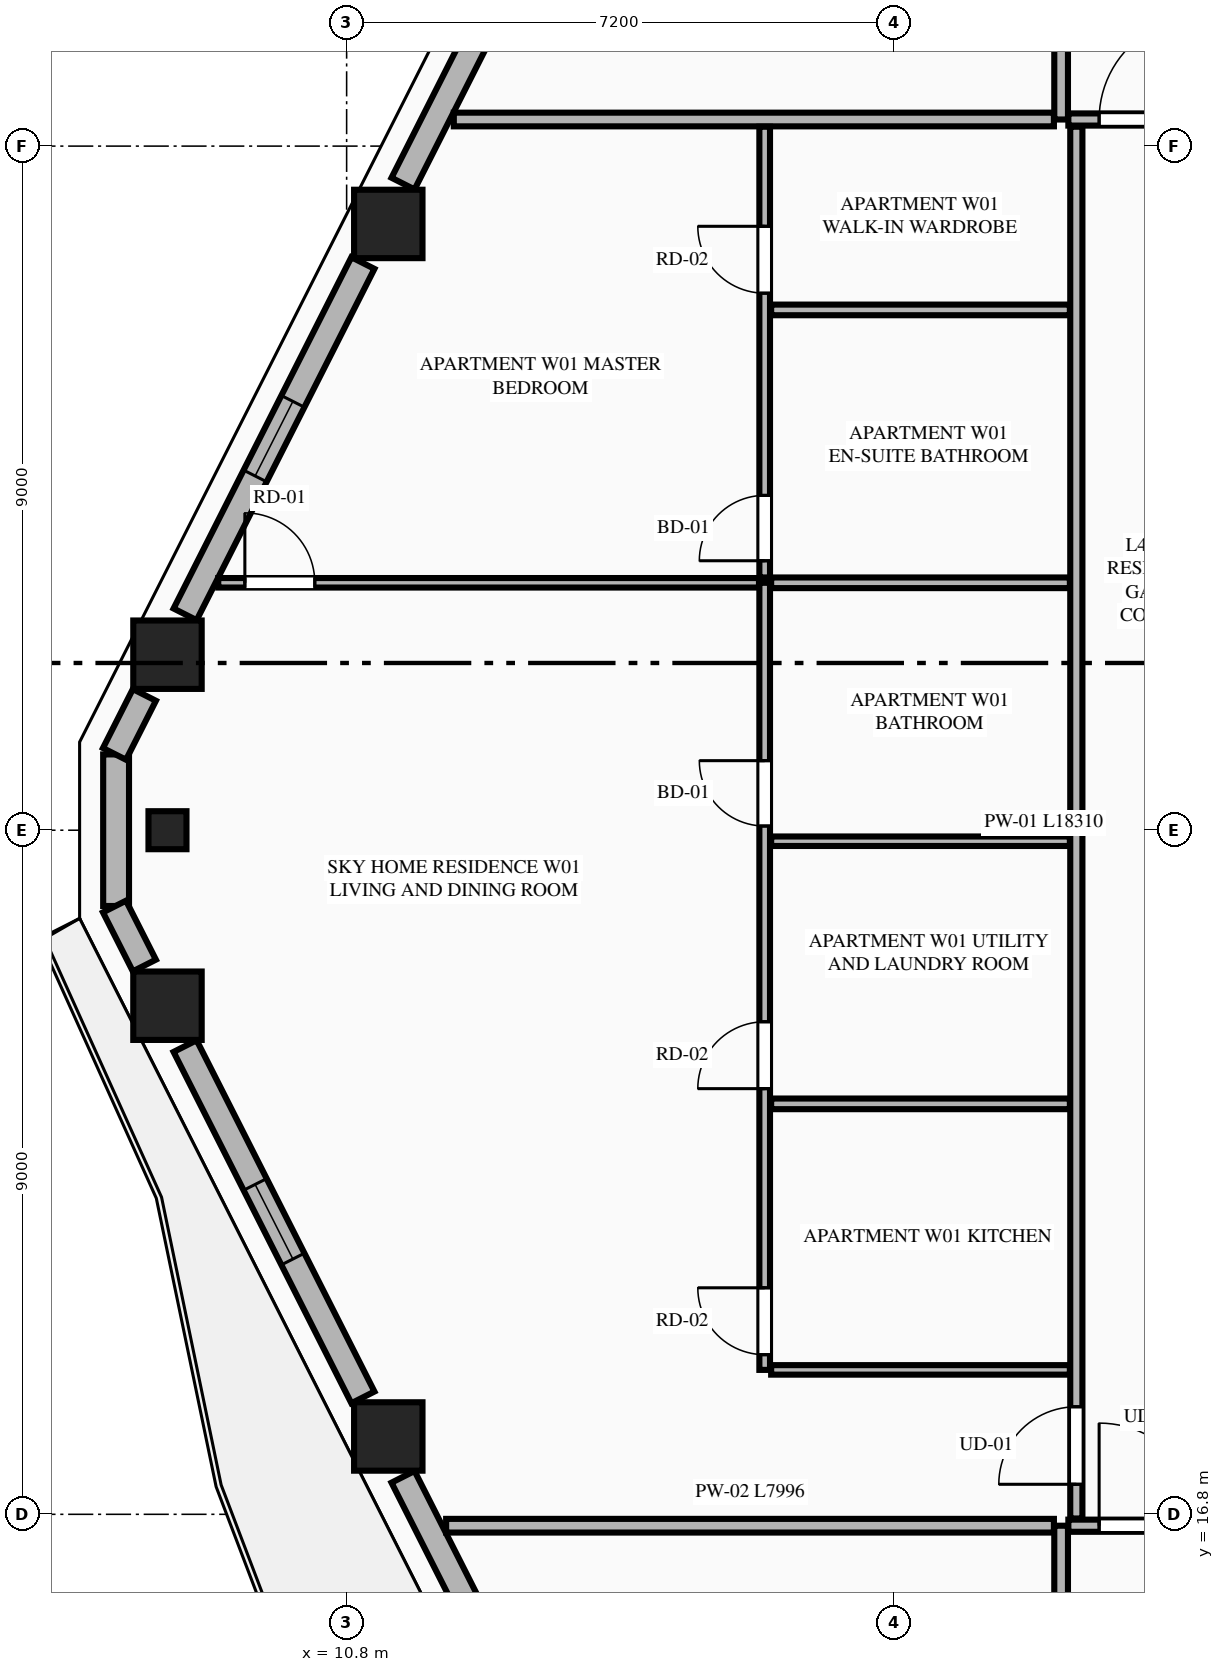
"""IFC4 building model, lengths in metres.
Left out: names, types, materials, properties, quantities, classifications, styles, units other than length and angle.
Written with IfcOpenShell. Run it as: python <this file> out.ifc"""

import sys

from ifc_helpers import new_model, si_unit, direction, frame, frame_2d, origin, origin_2d, place, context, subcontext, project, spatial, rectangle, extrude, element, fill, save


model = new_model("IFC4")
c1 = context("Model", 3, precision=1e-05, world=origin(), true_north=direction((0.0, 1.0)))
c2 = subcontext(c1, "Body", "Model", "MODEL_VIEW")
j1 = project(units=[si_unit("LENGTHUNIT", "METRE"), si_unit("PLANEANGLEUNIT", "RADIAN")], contexts=[c1])
p1 = place(None, origin())
s1 = spatial("IfcSite", under=j1, at=p1, CompositionType="ELEMENT")
p2 = place(p1, origin())
s2 = spatial("IfcBuilding", under=s1, at=p2, CompositionType="ELEMENT")
p3 = place(p2, frame((0.0, 0.0, 157.05)))
s3 = spatial("IfcBuildingStorey", under=s2, at=p3, CompositionType="ELEMENT", Elevation=157.05)
for number, where, z_axis, x_axis in (
    (1, (11.348, 33.776, 0.0), (0.0, 0.0, 1.0), (1.0, 0.0, 0.0)),
    (2, (8.443, 28.109, 0.0), (0.0, 0.0, 1.0), (1.0, 0.0, 0.0)),
    (3, (8.443, 23.491, 0.0), (0.0, 0.0, 1.0), (1.0, 0.0, 0.0)),
    (4, (11.348, 17.824, 0.0), (0.0, 0.0, 1.0), (1.0, 0.0, 0.0)),
):
    element("IfcColumn", number, at=place(p3, frame(where, z_axis=z_axis, x_axis=x_axis)), inside=s3, PredefinedType="COLUMN", context=c2, shape_type="SweptSolid", body=[
        extrude(rectangle(XDim=0.9, YDim=0.9, at=origin_2d()), origin(), (0.0, 0.0, 1.0), 3.55),
    ])
p4 = place(p3, frame((8.443, 25.8, 0.0), z_axis=(0.0, 0.0, 1.0), x_axis=(0.0, -1.0, 0.0)))
e5 = element("IfcColumn", 5, at=p4, inside=s3, PredefinedType="PILASTER", context=c2, shape_type="SweptSolid", body=[
    extrude(rectangle(XDim=0.5, YDim=0.35, at=origin_2d()), origin(), (0.0, 0.0, 1.0), 3.55),
])
p5 = place(p3, frame((7.767, 26.797, 0.0), z_axis=(0.0, 0.0, 1.0), x_axis=(0.0, -1.0, 0.0)))
e6 = element("IfcWall", 6, at=p5, inside=s3, PredefinedType="STANDARD", context=c2, shape_type="SweptSolid", body=[
    extrude(rectangle(XDim=1.994, YDim=0.34, at=frame_2d((0.997, 0.0))), origin(), (0.0, 0.0, 1.0), 3.34),
])
p6 = place(p3, frame((13.982, 39.129, 0.0), z_axis=(0.0, 0.0, 1.0), x_axis=(-0.451491174807, -0.892275584711, 0.0)))
e7 = element("IfcWall", 7, at=p6, inside=s3, PredefinedType="STANDARD", context=c2, shape_type="SweptSolid", body=[
    extrude(rectangle(XDim=5.404, YDim=0.34, at=frame_2d((2.702, 0.0))), origin(), (0.0, 0.0, 1.0), 2.797),
])
p7 = place(p6, frame((2.152, 0.0, 0.75)))
e8 = element("IfcOpeningElement", 8, at=p7, cuts=e7, PredefinedType="OPENING", context=c2, shape_type="SweptSolid", body=[
    extrude(rectangle(XDim=1.1, YDim=1.897, at=frame_2d((0.55, 0.948))), frame((0.0, 0.18, 0.0), z_axis=(0.0, -1.0, 0.0), x_axis=(1.0, 0.0, 0.0)), (0.0, 0.0, 1.0), 0.36),
])
p8 = place(p3, frame((11.014, 33.262, 0.0), z_axis=(0.0, 0.0, 1.0), x_axis=(-0.451506699894, -0.892267728852, 0.0)))
e9 = element("IfcWall", 9, at=p8, inside=s3, PredefinedType="STANDARD", context=c2, shape_type="SweptSolid", body=[
    extrude(rectangle(XDim=5.18, YDim=0.34, at=frame_2d((2.59, 0.0))), origin(), (0.0, 0.0, 1.0), 2.797),
])
p9 = place(p8, frame((2.04, 0.0, 0.75)))
e10 = element("IfcOpeningElement", 10, at=p9, cuts=e9, PredefinedType="OPENING", context=c2, shape_type="SweptSolid", body=[
    extrude(rectangle(XDim=1.1, YDim=1.897, at=frame_2d((0.55, 0.948))), frame((0.0, 0.18, 0.0), z_axis=(0.0, -1.0, 0.0), x_axis=(1.0, 0.0, 0.0)), (0.0, 0.0, 1.0), 0.36),
])
p10 = place(p3, frame((8.139, 27.58, 0.0), z_axis=(0.0, 0.0, 1.0), x_axis=(-0.451586578297, -0.892227304168, 0.0)))
e11 = element("IfcWall", 11, at=p10, inside=s3, PredefinedType="STANDARD", context=c2, shape_type="SweptSolid", body=[
    extrude(rectangle(XDim=0.87, YDim=0.34, at=frame_2d((0.435, 0.0))), origin(), (0.0, 0.0, 1.0), 3.34),
])
p11 = place(p3, frame((7.746, 24.796, 0.0), z_axis=(0.0, 0.0, 1.0), x_axis=(0.451699687084, -0.892170046957, 0.0)))
e12 = element("IfcWall", 12, at=p11, inside=s3, PredefinedType="STANDARD", context=c2, shape_type="SweptSolid", body=[
    extrude(rectangle(XDim=0.87, YDim=0.34, at=frame_2d((0.435, 0.0))), origin(), (0.0, 0.0, 1.0), 3.34),
])
p12 = place(p3, frame((8.675, 22.96, 0.0), z_axis=(0.0, 0.0, 1.0), x_axis=(0.451506699894, -0.892267728852, 0.0)))
e13 = element("IfcWall", 13, at=p12, inside=s3, PredefinedType="STANDARD", context=c2, shape_type="SweptSolid", body=[
    extrude(rectangle(XDim=5.18, YDim=0.34, at=frame_2d((2.59, 0.0))), origin(), (0.0, 0.0, 1.0), 2.797),
])
p13 = place(p12, frame((2.04, 0.0, 0.75)))
e14 = element("IfcOpeningElement", 14, at=p13, cuts=e13, PredefinedType="OPENING", context=c2, shape_type="SweptSolid", body=[
    extrude(rectangle(XDim=1.1, YDim=1.897, at=frame_2d((0.55, 0.948))), frame((0.0, 0.18, 0.0), z_axis=(0.0, -1.0, 0.0), x_axis=(1.0, 0.0, 0.0)), (0.0, 0.0, 1.0), 0.36),
])
p14 = place(p3, frame((11.542, 17.293, 0.0), z_axis=(0.0, 0.0, 1.0), x_axis=(0.451491174807, -0.892275584711, 0.0)))
e15 = element("IfcWall", 15, at=p14, inside=s3, PredefinedType="STANDARD", context=c2, shape_type="SweptSolid", body=[
    extrude(rectangle(XDim=5.404, YDim=0.34, at=frame_2d((2.702, 0.0))), origin(), (0.0, 0.0, 1.0), 2.797),
])
p15 = place(p14, frame((2.637, 0.0, 0.0)))
e16 = element("IfcOpeningElement", 16, at=p15, cuts=e15, PredefinedType="OPENING", context=c2, shape_type="SweptSolid", body=[
    extrude(rectangle(XDim=1.1, YDim=2.25, at=frame_2d((0.55, 1.125))), frame((0.0, 0.18, 0.0), z_axis=(0.0, -1.0, 0.0), x_axis=(1.0, 0.0, 0.0)), (0.0, 0.0, 1.0), 0.36),
])
p16 = place(p3, frame((20.2, 4.105, 0.0), z_axis=(0.0, 0.0, 1.0), x_axis=(0.0, 1.0, 0.0)))
e17 = element("IfcWall", 17, at=p16, inside=s3, PredefinedType="PARTITIONING", context=c2, shape_type="SweptSolid", body=[
    extrude(rectangle(XDim=12.545, YDim=0.18, at=frame_2d((6.272, 0.0))), origin(), (0.0, 0.0, 1.0), 3.34),
])
p17 = place(p3, frame((20.295, 16.65, 0.0), z_axis=(0.0, 0.0, 1.0), x_axis=(1.0, 0.0, 0.0)))
e18 = element("IfcWall", 18, at=p17, inside=s3, PredefinedType="PARTITIONING", context=c2, shape_type="SweptSolid", body=[
    extrude(rectangle(XDim=15.842, YDim=0.16, at=frame_2d((7.921, 0.0))), origin(), (0.0, 0.0, 1.0), 3.34),
])
p18 = place(p17, frame((0.405, 0.0, 0.0)))
e19 = element("IfcOpeningElement", 19, at=p18, cuts=e18, PredefinedType="OPENING", context=c2, shape_type="SweptSolid", body=[
    extrude(rectangle(XDim=1.35, YDim=2.35, at=frame_2d((0.675, 1.175))), frame((0.0, 0.09, 0.0), z_axis=(0.0, -1.0, 0.0), x_axis=(1.0, 0.0, 0.0)), (0.0, 0.0, 1.0), 0.18),
])
p19 = place(p3, frame((20.2, 35.15, 0.0), z_axis=(0.0, 0.0, 1.0), x_axis=(0.0, 1.0, 0.0)))
e20 = element("IfcWall", 20, at=p19, inside=s3, PredefinedType="PARTITIONING", context=c2, shape_type="SweptSolid", body=[
    extrude(rectangle(XDim=12.345, YDim=0.18, at=frame_2d((6.173, 0.0))), origin(), (0.0, 0.0, 1.0), 3.34),
])
p20 = place(p3, frame((20.295, 35.15, 0.0), z_axis=(0.0, 0.0, 1.0), x_axis=(1.0, 0.0, 0.0)))
e21 = element("IfcWall", 21, at=p20, inside=s3, PredefinedType="PARTITIONING", context=c2, shape_type="SweptSolid", body=[
    extrude(rectangle(XDim=24.21, YDim=0.16, at=frame_2d((12.105, 0.0))), origin(), (0.0, 0.0, 1.0), 3.34),
])
p21 = place(p20, frame((0.405, 0.0, 0.0)))
e22 = element("IfcOpeningElement", 22, at=p21, cuts=e21, PredefinedType="OPENING", context=c2, shape_type="SweptSolid", body=[
    extrude(rectangle(XDim=1.35, YDim=2.35, at=frame_2d((0.675, 1.175))), frame((0.0, 0.09, 0.0), z_axis=(0.0, -1.0, 0.0), x_axis=(1.0, 0.0, 0.0)), (0.0, 0.0, 1.0), 0.18),
])
p22 = place(p3, frame((12.109, 16.65, 0.0), z_axis=(0.0, 0.0, 1.0), x_axis=(1.0, 0.0, 0.0)))
e23 = element("IfcWall", 23, at=p22, inside=s3, PredefinedType="PARTITIONING", context=c2, shape_type="SweptSolid", body=[
    extrude(rectangle(XDim=7.996, YDim=0.18, at=frame_2d((3.998, 0.0))), origin(), (0.0, 0.0, 1.0), 3.34),
])
p23 = place(p3, frame((12.21, 35.15, 0.0), z_axis=(0.0, 0.0, 1.0), x_axis=(1.0, 0.0, 0.0)))
e24 = element("IfcWall", 24, at=p23, inside=s3, PredefinedType="PARTITIONING", context=c2, shape_type="SweptSolid", body=[
    extrude(rectangle(XDim=7.895, YDim=0.18, at=frame_2d((3.948, 0.0))), origin(), (0.0, 0.0, 1.0), 3.34),
])
p24 = place(p3, frame((20.4, 16.745, 0.0), z_axis=(0.0, 0.0, 1.0), x_axis=(0.0, 1.0, 0.0)))
e25 = element("IfcWall", 25, at=p24, inside=s3, PredefinedType="PARTITIONING", context=c2, shape_type="SweptSolid", body=[
    extrude(rectangle(XDim=18.31, YDim=0.16, at=frame_2d((9.155, 0.0))), origin(), (0.0, 0.0, 1.0), 3.34),
])
p25 = place(p24, frame((0.45, 0.0, 0.0)))
e26 = element("IfcOpeningElement", 26, at=p25, cuts=e25, PredefinedType="OPENING", context=c2, shape_type="SweptSolid", body=[
    extrude(rectangle(XDim=1.02, YDim=2.25, at=frame_2d((0.51, 1.125))), frame((0.0, 0.09, 0.0), z_axis=(0.0, -1.0, 0.0), x_axis=(1.0, 0.0, 0.0)), (0.0, 0.0, 1.0), 0.18),
])
p26 = place(p3, frame((16.385, 18.7, 0.0), z_axis=(0.0, 0.0, 1.0), x_axis=(1.0, 0.0, 0.0)))
e27 = element("IfcWall", 27, at=p26, inside=s3, PredefinedType="PARTITIONING", context=c2, shape_type="SweptSolid", body=[
    extrude(rectangle(XDim=3.93, YDim=0.125, at=frame_2d((1.965, 0.0))), origin(), (0.0, 0.0, 1.0), 2.722),
])
p27 = place(p3, frame((16.3, 18.7, 0.0), z_axis=(0.0, 0.0, 1.0), x_axis=(0.0, 1.0, 0.0)))
e28 = element("IfcWall", 28, at=p27, inside=s3, PredefinedType="PLUMBINGWALL", context=c2, shape_type="SweptSolid", body=[
    extrude(rectangle(XDim=10.355, YDim=0.14, at=frame_2d((5.177, 0.0))), origin(), (0.0, 0.0, 1.0), 3.34),
])
p28 = place(p27, frame((0.2, 0.0, 0.0)))
e29 = element("IfcOpeningElement", 29, at=p28, cuts=e28, PredefinedType="OPENING", context=c2, shape_type="SweptSolid", body=[
    extrude(rectangle(XDim=0.88, YDim=2.15, at=frame_2d((0.44, 1.075))), frame((0.0, 0.08, 0.0), z_axis=(0.0, -1.0, 0.0), x_axis=(1.0, 0.0, 0.0)), (0.0, 0.0, 1.0), 0.16),
])
p29 = place(p27, frame((3.7, 0.0, 0.0)))
e30 = element("IfcOpeningElement", 30, at=p29, cuts=e28, PredefinedType="OPENING", context=c2, shape_type="SweptSolid", body=[
    extrude(rectangle(XDim=0.88, YDim=2.15, at=frame_2d((0.44, 1.075))), frame((0.0, 0.08, 0.0), z_axis=(0.0, -1.0, 0.0), x_axis=(1.0, 0.0, 0.0)), (0.0, 0.0, 1.0), 0.16),
])
p30 = place(p27, frame((7.155, 0.0, 0.0)))
e31 = element("IfcOpeningElement", 31, at=p30, cuts=e28, PredefinedType="OPENING", context=c2, shape_type="SweptSolid", body=[
    extrude(rectangle(XDim=0.86, YDim=2.1, at=frame_2d((0.43, 1.05))), frame((0.0, 0.08, 0.0), z_axis=(0.0, -1.0, 0.0), x_axis=(1.0, 0.0, 0.0)), (0.0, 0.0, 1.0), 0.16),
])
p31 = place(p3, frame((16.3, 29.125, 0.0), z_axis=(0.0, 0.0, 1.0), x_axis=(0.0, 1.0, 0.0)))
e32 = element("IfcWall", 32, at=p31, inside=s3, PredefinedType="PLUMBINGWALL", context=c2, shape_type="SweptSolid", body=[
    extrude(rectangle(XDim=5.93, YDim=0.14, at=frame_2d((2.965, 0.0))), origin(), (0.0, 0.0, 1.0), 3.34),
])
p32 = place(p31, frame((0.22, 0.0, 0.0)))
e33 = element("IfcOpeningElement", 33, at=p32, cuts=e32, PredefinedType="OPENING", context=c2, shape_type="SweptSolid", body=[
    extrude(rectangle(XDim=0.86, YDim=2.1, at=frame_2d((0.43, 1.05))), frame((0.0, 0.08, 0.0), z_axis=(0.0, -1.0, 0.0), x_axis=(1.0, 0.0, 0.0)), (0.0, 0.0, 1.0), 0.16),
])
p33 = place(p31, frame((3.74, 0.0, 0.0)))
e34 = element("IfcOpeningElement", 34, at=p33, cuts=e32, PredefinedType="OPENING", context=c2, shape_type="SweptSolid", body=[
    extrude(rectangle(XDim=0.88, YDim=2.15, at=frame_2d((0.44, 1.075))), frame((0.0, 0.08, 0.0), z_axis=(0.0, -1.0, 0.0), x_axis=(1.0, 0.0, 0.0)), (0.0, 0.0, 1.0), 0.16),
])
p34 = place(p3, frame((16.385, 29.055, 0.0), z_axis=(0.0, 0.0, 1.0), x_axis=(1.0, 0.0, 0.0)))
e35 = element("IfcWall", 35, at=p34, inside=s3, PredefinedType="PLUMBINGWALL", context=c2, shape_type="SweptSolid", body=[
    extrude(rectangle(XDim=3.93, YDim=0.14, at=frame_2d((1.965, 0.0))), origin(), (0.0, 0.0, 1.0), 3.34),
])
p35 = place(p3, frame((9.111, 29.055, 0.0), z_axis=(0.0, 0.0, 1.0), x_axis=(1.0, 0.0, 0.0)))
e36 = element("IfcWall", 36, at=p35, inside=s3, PredefinedType="PARTITIONING", context=c2, shape_type="SweptSolid", body=[
    extrude(rectangle(XDim=7.114, YDim=0.125, at=frame_2d((3.557, 0.0))), origin(), (0.0, 0.0, 1.0), 3.34),
])
p36 = place(p35, frame((0.35, 0.0, 0.0)))
e37 = element("IfcOpeningElement", 37, at=p36, cuts=e36, PredefinedType="OPENING", context=c2, shape_type="SweptSolid", body=[
    extrude(rectangle(XDim=0.92, YDim=2.15, at=frame_2d((0.46, 1.075))), frame((0.0, 0.073, 0.0), z_axis=(0.0, -1.0, 0.0), x_axis=(1.0, 0.0, 0.0)), (0.0, 0.0, 1.0), 0.145),
])
p37 = place(p3, frame((16.385, 22.2, 0.0), z_axis=(0.0, 0.0, 1.0), x_axis=(1.0, 0.0, 0.0)))
e38 = element("IfcWall", 38, at=p37, inside=s3, PredefinedType="PLUMBINGWALL", context=c2, shape_type="SweptSolid", body=[
    extrude(rectangle(XDim=3.93, YDim=0.14, at=frame_2d((1.965, 0.0))), origin(), (0.0, 0.0, 1.0), 3.34),
])
p38 = place(p3, frame((16.385, 25.655, 0.0), z_axis=(0.0, 0.0, 1.0), x_axis=(1.0, 0.0, 0.0)))
e39 = element("IfcWall", 39, at=p38, inside=s3, PredefinedType="PARTITIONING", context=c2, shape_type="SweptSolid", body=[
    extrude(rectangle(XDim=3.93, YDim=0.125, at=frame_2d((1.965, 0.0))), origin(), (0.0, 0.0, 1.0), 3.34),
])
p39 = place(p3, frame((16.385, 32.645, 0.0), z_axis=(0.0, 0.0, 1.0), x_axis=(1.0, 0.0, 0.0)))
e40 = element("IfcWall", 40, at=p39, inside=s3, PredefinedType="PLUMBINGWALL", context=c2, shape_type="SweptSolid", body=[
    extrude(rectangle(XDim=3.93, YDim=0.14, at=frame_2d((1.965, 0.0))), origin(), (0.0, 0.0, 1.0), 3.34),
])
p40 = place(p9, origin())
e41 = element("IfcWindow", 41, at=p40, inside=s3, PartitioningType="SINGLE_PANEL", PredefinedType="WINDOW", context=c2, shape_type="SweptSolid", body=[
    extrude(rectangle(XDim=1.1, YDim=1.897, at=frame_2d((0.55, 0.948))), frame((0.0, 0.03, 0.0), z_axis=(0.0, -1.0, 0.0), x_axis=(1.0, 0.0, 0.0)), (0.0, 0.0, 1.0), 0.06),
])
fill(e10, e41)
p41 = place(p13, origin())
e42 = element("IfcWindow", 42, at=p41, inside=s3, PartitioningType="SINGLE_PANEL", PredefinedType="WINDOW", context=c2, shape_type="SweptSolid", body=[
    extrude(rectangle(XDim=1.1, YDim=1.897, at=frame_2d((0.55, 0.948))), frame((0.0, 0.03, 0.0), z_axis=(0.0, -1.0, 0.0), x_axis=(1.0, 0.0, 0.0)), (0.0, 0.0, 1.0), 0.06),
])
fill(e14, e42)
p42 = place(p18, origin())
e43 = element("IfcDoor", 43, at=p42, inside=s3, OperationType="SINGLE_SWING_LEFT", PredefinedType="DOOR", context=c2, shape_type="SweptSolid", body=[
    extrude(rectangle(XDim=1.35, YDim=2.35, at=frame_2d((0.675, 1.175))), frame((0.0, 0.025, 0.0), z_axis=(0.0, -1.0, 0.0), x_axis=(1.0, 0.0, 0.0)), (0.0, 0.0, 1.0), 0.05),
])
fill(e19, e43)
p43 = place(p21, origin())
e44 = element("IfcDoor", 44, at=p43, inside=s3, OperationType="SINGLE_SWING_RIGHT", PredefinedType="DOOR", context=c2, shape_type="SweptSolid", body=[
    extrude(rectangle(XDim=1.35, YDim=2.35, at=frame_2d((0.675, 1.175))), frame((0.0, 0.025, 0.0), z_axis=(0.0, -1.0, 0.0), x_axis=(1.0, 0.0, 0.0)), (0.0, 0.0, 1.0), 0.05),
])
fill(e22, e44)
p44 = place(p28, origin())
e45 = element("IfcDoor", 45, at=p44, inside=s3, OperationType="SINGLE_SWING_RIGHT", PredefinedType="DOOR", context=c2, shape_type="SweptSolid", body=[
    extrude(rectangle(XDim=0.88, YDim=2.15, at=frame_2d((0.44, 1.075))), frame((0.0, 0.025, 0.0), z_axis=(0.0, -1.0, 0.0), x_axis=(1.0, 0.0, 0.0)), (0.0, 0.0, 1.0), 0.05),
])
fill(e29, e45)
p45 = place(p29, origin())
e46 = element("IfcDoor", 46, at=p45, inside=s3, OperationType="SINGLE_SWING_LEFT", PredefinedType="DOOR", context=c2, shape_type="SweptSolid", body=[
    extrude(rectangle(XDim=0.88, YDim=2.15, at=frame_2d((0.44, 1.075))), frame((0.0, 0.025, 0.0), z_axis=(0.0, -1.0, 0.0), x_axis=(1.0, 0.0, 0.0)), (0.0, 0.0, 1.0), 0.05),
])
fill(e30, e46)
p46 = place(p30, origin())
e47 = element("IfcDoor", 47, at=p46, inside=s3, OperationType="SINGLE_SWING_RIGHT", PredefinedType="DOOR", context=c2, shape_type="SweptSolid", body=[
    extrude(rectangle(XDim=0.86, YDim=2.1, at=frame_2d((0.43, 1.05))), frame((0.0, 0.025, 0.0), z_axis=(0.0, -1.0, 0.0), x_axis=(1.0, 0.0, 0.0)), (0.0, 0.0, 1.0), 0.05),
])
fill(e31, e47)
p47 = place(p32, origin())
e48 = element("IfcDoor", 48, at=p47, inside=s3, OperationType="SINGLE_SWING_LEFT", PredefinedType="DOOR", context=c2, shape_type="SweptSolid", body=[
    extrude(rectangle(XDim=0.86, YDim=2.1, at=frame_2d((0.43, 1.05))), frame((0.0, 0.025, 0.0), z_axis=(0.0, -1.0, 0.0), x_axis=(1.0, 0.0, 0.0)), (0.0, 0.0, 1.0), 0.05),
])
fill(e33, e48)
p48 = place(p33, origin())
e49 = element("IfcDoor", 49, at=p48, inside=s3, OperationType="SINGLE_SWING_RIGHT", PredefinedType="DOOR", context=c2, shape_type="SweptSolid", body=[
    extrude(rectangle(XDim=0.88, YDim=2.15, at=frame_2d((0.44, 1.075))), frame((0.0, 0.025, 0.0), z_axis=(0.0, -1.0, 0.0), x_axis=(1.0, 0.0, 0.0)), (0.0, 0.0, 1.0), 0.05),
])
fill(e34, e49)
p49 = place(p25, origin())
e50 = element("IfcDoor", 50, at=p49, inside=s3, OperationType="SINGLE_SWING_LEFT", PredefinedType="DOOR", context=c2, shape_type="SweptSolid", body=[
    extrude(rectangle(XDim=1.02, YDim=2.25, at=frame_2d((0.51, 1.125))), frame((0.0, 0.025, 0.0), z_axis=(0.0, -1.0, 0.0), x_axis=(1.0, 0.0, 0.0)), (0.0, 0.0, 1.0), 0.05),
])
fill(e26, e50)
p50 = place(p36, origin())
e51 = element("IfcDoor", 51, at=p50, inside=s3, OperationType="SINGLE_SWING_LEFT", PredefinedType="DOOR", context=c2, shape_type="SweptSolid", body=[
    extrude(rectangle(XDim=0.92, YDim=2.15, at=frame_2d((0.46, 1.075))), frame((0.0, 0.025, 0.0), z_axis=(0.0, -1.0, 0.0), x_axis=(1.0, 0.0, 0.0)), (0.0, 0.0, 1.0), 0.05),
])
fill(e37, e51)
save(model, sys.argv[1])
